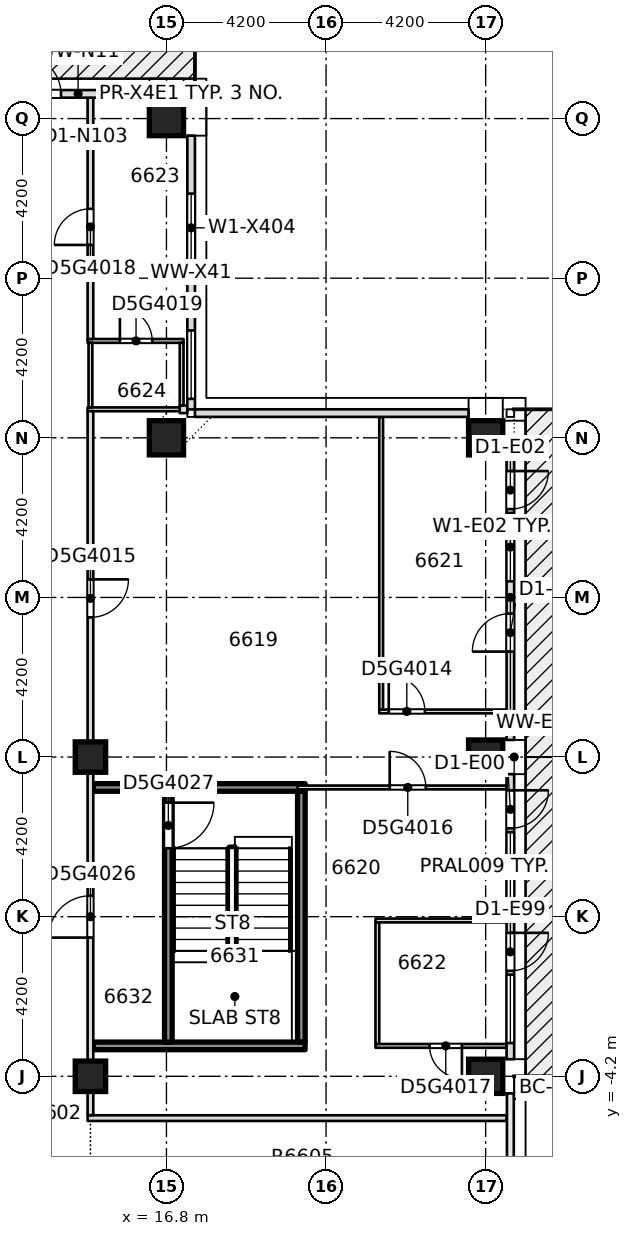
"""IFC4 building model, lengths in metres.
Left out: names, types, materials, properties, quantities, classifications, styles, units other than length and angle.
Written with IfcOpenShell. Run it as: python <this file> out.ifc"""

import sys

from ifc_helpers import new_model, si_unit, direction, frame, frame_2d, origin, origin_2d, place, context, subcontext, project, spatial, rectangle, extrude, element, fill, save


model = new_model("IFC4")
c1 = context("Model", 3, precision=1e-05, world=origin(), true_north=direction((0.0, 1.0)))
c2 = subcontext(c1, "Body", "Model", "MODEL_VIEW")
j1 = project(units=[si_unit("LENGTHUNIT", "METRE"), si_unit("PLANEANGLEUNIT", "RADIAN")], contexts=[c1])
p1 = place(None, origin())
s1 = spatial("IfcSite", under=j1, at=p1, CompositionType="ELEMENT")
p2 = place(p1, origin())
s2 = spatial("IfcBuilding", under=s1, at=p2, CompositionType="ELEMENT")
p3 = place(p2, frame((0.0, 0.0, 251.05)))
s3 = spatial("IfcBuildingStorey", under=s2, at=p3, CompositionType="ELEMENT", Elevation=251.05)
for number, where, z_axis, x_axis in (
    (1, (25.2, -4.2, -0.4), (0.0, 0.0, 1.0), (1.0, 0.0, 0.0)),
    (2, (25.2, 4.2, -0.4), (0.0, 0.0, 1.0), (1.0, 0.0, 0.0)),
    (3, (16.8, 12.6, -0.4), (0.0, 0.0, 1.0), (1.0, 0.0, 0.0)),
    (4, (25.2, 12.6, -0.4), (0.0, 0.0, 1.0), (1.0, 0.0, 0.0)),
    (5, (16.8, 21.0, -0.4), (0.0, 0.0, 1.0), (1.0, 0.0, 0.0)),
):
    element("IfcColumn", number, at=place(p3, frame(where, z_axis=z_axis, x_axis=x_axis)), inside=s3, PredefinedType="COLUMN", context=c2, shape_type="SweptSolid", body=[
        extrude(rectangle(XDim=0.9, YDim=0.9, at=origin_2d()), origin(), (0.0, 0.0, 1.0), 3.45),
    ])
for number, where, z_axis, x_axis in (
    (6, (14.8, -4.2, -0.4), (0.0, 0.0, 1.0), (1.0, 0.0, 0.0)),
    (7, (14.8, 4.2, -0.4), (0.0, 0.0, 1.0), (1.0, 0.0, 0.0)),
):
    element("IfcColumn", number, at=place(p3, frame(where, z_axis=z_axis, x_axis=x_axis)), inside=s3, PredefinedType="COLUMN", context=c2, shape_type="SweptSolid", body=[
        extrude(rectangle(XDim=0.8, YDim=0.8, at=origin_2d()), origin(), (0.0, 0.0, 1.0), 3.45),
    ])
p4 = place(p3, frame((14.727, -5.3, 0.0), z_axis=(0.0, 0.0, 1.0), x_axis=(1.0, 0.0, 0.0)))
e8 = element("IfcWall", 8, at=p4, inside=s3, PredefinedType="PARTITIONING", context=c2, shape_type="SweptSolid", body=[
    extrude(rectangle(XDim=11.023, YDim=0.15, at=frame_2d((5.511, 0.0))), origin(), (0.0, 0.0, 1.0), 3.05),
])
p5 = place(p3, frame((14.877, -3.4, 0.0), z_axis=(0.0, 0.0, 1.0), x_axis=(1.0, 0.0, 0.0)))
e9 = element("IfcWall", 9, at=p5, inside=s3, PredefinedType="SOLIDWALL", context=c2, shape_type="SweptSolid", body=[
    extrude(rectangle(XDim=5.571, YDim=0.2, at=frame_2d((2.786, 0.0))), origin(), (0.0, 0.0, 1.0), 3.05),
])
p6 = place(p3, frame((22.302, -3.4, 0.0), z_axis=(0.0, 0.0, 1.0), x_axis=(1.0, 0.0, 0.0)))
e10 = element("IfcWall", 10, at=p6, inside=s3, PredefinedType="PARTITIONING", context=c2, shape_type="SweptSolid", body=[
    extrude(rectangle(XDim=3.448, YDim=0.1, at=frame_2d((1.724, 0.0))), origin(), (0.0, 0.0, 1.0), 3.05),
])
p7 = place(p6, frame((1.423, 0.0, 0.0)))
e11 = element("IfcOpeningElement", 11, at=p7, cuts=e10, PredefinedType="OPENING", context=c2, shape_type="SweptSolid", body=[
    extrude(rectangle(XDim=0.85, YDim=2.1, at=frame_2d((0.425, 1.05))), frame((0.0, 0.06, 0.0), z_axis=(0.0, -1.0, 0.0), x_axis=(1.0, 0.0, 0.0)), (0.0, 0.0, 1.0), 0.12),
])
p8 = place(p3, frame((22.302, -0.1, 0.0), z_axis=(0.0, 0.0, 1.0), x_axis=(1.0, 0.0, 0.0)))
e12 = element("IfcWall", 12, at=p8, inside=s3, PredefinedType="PARTITIONING", context=c2, shape_type="SweptSolid", body=[
    extrude(rectangle(XDim=3.448, YDim=0.1, at=frame_2d((1.724, 0.0))), origin(), (0.0, 0.0, 1.0), 3.05),
])
p9 = place(p3, frame((14.875, 3.4, 0.0), z_axis=(0.0, 0.0, 1.0), x_axis=(1.0, 0.0, 0.0)))
e13 = element("IfcWall", 13, at=p9, inside=s3, PredefinedType="SOLIDWALL", context=c2, shape_type="SweptSolid", body=[
    extrude(rectangle(XDim=5.575, YDim=0.2, at=frame_2d((2.788, 0.0))), origin(), (0.0, 0.0, 1.0), 3.05),
])
p10 = place(p3, frame((20.25, 3.4, 0.0), z_axis=(0.0, 0.0, 1.0), x_axis=(1.0, 0.0, 0.0)))
e14 = element("IfcWall", 14, at=p10, inside=s3, PredefinedType="PARTITIONING", context=c2, shape_type="SweptSolid", body=[
    extrude(rectangle(XDim=5.5, YDim=0.1, at=frame_2d((2.75, 0.0))), origin(), (0.0, 0.0, 1.0), 3.05),
])
p11 = place(p10, frame((2.425, 0.0, 0.0)))
e15 = element("IfcOpeningElement", 15, at=p11, cuts=e14, PredefinedType="OPENING", context=c2, shape_type="SweptSolid", body=[
    extrude(rectangle(XDim=0.95, YDim=2.1, at=frame_2d((0.475, 1.05))), frame((0.0, 0.06, 0.0), z_axis=(0.0, -1.0, 0.0), x_axis=(1.0, 0.0, 0.0)), (0.0, 0.0, 1.0), 0.12),
])
p12 = place(p3, frame((22.4, 5.4, 0.0), z_axis=(0.0, 0.0, 1.0), x_axis=(1.0, 0.0, 0.0)))
e16 = element("IfcWall", 16, at=p12, inside=s3, PredefinedType="PARTITIONING", context=c2, shape_type="SweptSolid", body=[
    extrude(rectangle(XDim=3.35, YDim=0.1, at=frame_2d((1.675, 0.0))), origin(), (0.0, 0.0, 1.0), 3.05),
])
p13 = place(p12, frame((0.25, 0.0, 0.0)))
e17 = element("IfcOpeningElement", 17, at=p13, cuts=e16, PredefinedType="OPENING", context=c2, shape_type="SweptSolid", body=[
    extrude(rectangle(XDim=0.95, YDim=2.1, at=frame_2d((0.475, 1.05))), frame((0.0, 0.06, 0.0), z_axis=(0.0, -1.0, 0.0), x_axis=(1.0, 0.0, 0.0)), (0.0, 0.0, 1.0), 0.12),
])
p14 = place(p3, frame((14.725, 13.35, 0.0), z_axis=(0.0, 0.0, 1.0), x_axis=(1.0, 0.0, 0.0)))
e18 = element("IfcWall", 18, at=p14, inside=s3, PredefinedType="PARTITIONING", context=c2, shape_type="SweptSolid", body=[
    extrude(rectangle(XDim=2.525, YDim=0.1, at=frame_2d((1.262, 0.0))), origin(), (0.0, 0.0, 1.0), 3.05),
])
p15 = place(p3, frame((17.15, 13.35, 0.0), z_axis=(0.0, 0.0, 1.0), x_axis=(1.0, 0.0, 0.0)))
e19 = element("IfcWall", 19, at=p15, inside=s3, PredefinedType="PARTITIONING", context=c2, shape_type="SweptSolid", body=[
    extrude(rectangle(XDim=0.2, YDim=0.2, at=frame_2d((0.1, 0.0))), origin(), (0.0, 0.0, 1.0), 3.05),
])
p16 = place(p3, frame((14.725, 15.15, 0.0), z_axis=(0.0, 0.0, 1.0), x_axis=(1.0, 0.0, 0.0)))
e20 = element("IfcWall", 20, at=p16, inside=s3, PredefinedType="PARTITIONING", context=c2, shape_type="SweptSolid", body=[
    extrude(rectangle(XDim=2.525, YDim=0.1, at=frame_2d((1.262, 0.0))), origin(), (0.0, 0.0, 1.0), 3.05),
])
p17 = place(p16, frame((0.85, 0.0, 0.0)))
e21 = element("IfcOpeningElement", 21, at=p17, cuts=e20, PredefinedType="OPENING", context=c2, shape_type="SweptSolid", body=[
    extrude(rectangle(XDim=0.85, YDim=2.1, at=frame_2d((0.425, 1.05))), frame((0.0, 0.06, 0.0), z_axis=(0.0, -1.0, 0.0), x_axis=(1.0, 0.0, 0.0)), (0.0, 0.0, 1.0), 0.12),
])
p18 = place(p3, frame((14.8, -5.223, 0.0), z_axis=(0.0, 0.0, 1.0), x_axis=(0.0, 1.0, 0.0)))
e22 = element("IfcWall", 22, at=p18, inside=s3, PredefinedType="PARTITIONING", context=c2, shape_type="SweptSolid", body=[
    extrude(rectangle(XDim=18.523, YDim=0.15, at=frame_2d((9.261, 0.0))), origin(), (0.0, 0.0, 1.0), 3.05),
])
p19 = place(p18, frame((13.098, 0.0, 0.0)))
e23 = element("IfcOpeningElement", 23, at=p19, cuts=e22, PredefinedType="OPENING", context=c2, shape_type="SweptSolid", body=[
    extrude(rectangle(XDim=1.0, YDim=2.1, at=frame_2d((0.5, 1.05))), frame((0.0, 0.085, 0.0), z_axis=(0.0, -1.0, 0.0), x_axis=(1.0, 0.0, 0.0)), (0.0, 0.0, 1.0), 0.17),
])
p20 = place(p18, frame((4.673, 0.0, 0.0)))
e24 = element("IfcOpeningElement", 24, at=p20, cuts=e22, PredefinedType="OPENING", context=c2, shape_type="SweptSolid", body=[
    extrude(rectangle(XDim=1.1, YDim=2.1, at=frame_2d((0.55, 1.05))), frame((0.0, 0.085, 0.0), z_axis=(0.0, -1.0, 0.0), x_axis=(1.0, 0.0, 0.0)), (0.0, 0.0, 1.0), 0.17),
])
p21 = place(p3, frame((14.8, 13.4, 0.0), z_axis=(0.0, 0.0, 1.0), x_axis=(0.0, 1.0, 0.0)))
e25 = element("IfcWall", 25, at=p21, inside=s3, PredefinedType="PARTITIONING", context=c2, shape_type="SweptSolid", body=[
    extrude(rectangle(XDim=1.7, YDim=0.1, at=frame_2d((0.85, 0.0))), origin(), (0.0, 0.0, 1.0), 3.05),
])
p22 = place(p3, frame((14.8, 15.2, 0.0), z_axis=(0.0, 0.0, 1.0), x_axis=(0.0, 1.0, 0.0)))
e26 = element("IfcWall", 26, at=p22, inside=s3, PredefinedType="PARTITIONING", context=c2, shape_type="SweptSolid", body=[
    extrude(rectangle(XDim=6.35, YDim=0.15, at=frame_2d((3.175, 0.0))), origin(), (0.0, 0.0, 1.0), 3.05),
])
p23 = place(p22, frame((2.475, 0.0, 0.0)))
e27 = element("IfcOpeningElement", 27, at=p23, cuts=e26, PredefinedType="OPENING", context=c2, shape_type="SweptSolid", body=[
    extrude(rectangle(XDim=0.95, YDim=2.1, at=frame_2d((0.475, 1.05))), frame((0.0, 0.085, 0.0), z_axis=(0.0, -1.0, 0.0), x_axis=(1.0, 0.0, 0.0)), (0.0, 0.0, 1.0), 0.17),
])
p24 = place(p3, frame((16.85, -3.3, 0.0), z_axis=(0.0, 0.0, 1.0), x_axis=(0.0, 1.0, 0.0)))
e28 = element("IfcWall", 28, at=p24, inside=s3, PredefinedType="SOLIDWALL", context=c2, shape_type="SweptSolid", body=[
    extrude(rectangle(XDim=6.6, YDim=0.2, at=frame_2d((3.3, 0.0))), origin(), (0.0, 0.0, 1.0), 3.05),
])
p25 = place(p24, frame((5.1, 0.0, 0.0)))
e29 = element("IfcOpeningElement", 29, at=p25, cuts=e28, PredefinedType="OPENING", context=c2, shape_type="SweptSolid", body=[
    extrude(rectangle(XDim=1.2, YDim=2.1, at=frame_2d((0.6, 1.05))), frame((0.0, 0.11, 0.0), z_axis=(0.0, -1.0, 0.0), x_axis=(1.0, 0.0, 0.0)), (0.0, 0.0, 1.0), 0.22),
])
p26 = place(p3, frame((17.2, 13.45, 0.0), z_axis=(0.0, 0.0, 1.0), x_axis=(0.0, 1.0, 0.0)))
e30 = element("IfcWall", 30, at=p26, inside=s3, PredefinedType="PARTITIONING", context=c2, shape_type="SweptSolid", body=[
    extrude(rectangle(XDim=1.65, YDim=0.1, at=frame_2d((0.825, 0.0))), origin(), (0.0, 0.0, 1.0), 3.05),
])
p27 = place(p3, frame((20.35, -3.298, 0.0), z_axis=(0.0, 0.0, 1.0), x_axis=(0.0, 1.0, 0.0)))
e31 = element("IfcWall", 31, at=p27, inside=s3, PredefinedType="SOLIDWALL", context=c2, shape_type="SweptSolid", body=[
    extrude(rectangle(XDim=6.598, YDim=0.2, at=frame_2d((3.299, 0.0))), origin(), (0.0, 0.0, 1.0), 3.05),
])
p28 = place(p3, frame((22.35, -3.348, 0.0), z_axis=(0.0, 0.0, 1.0), x_axis=(0.0, 1.0, 0.0)))
e32 = element("IfcWall", 32, at=p28, inside=s3, PredefinedType="PARTITIONING", context=c2, shape_type="SweptSolid", body=[
    extrude(rectangle(XDim=3.196, YDim=0.1, at=frame_2d((1.598, 0.0))), origin(), (0.0, 0.0, 1.0), 3.05),
])
p29 = place(p3, frame((22.45, 5.45, 0.0), z_axis=(0.0, 0.0, 1.0), x_axis=(0.0, 1.0, 0.0)))
e33 = element("IfcWall", 33, at=p29, inside=s3, PredefinedType="PARTITIONING", context=c2, shape_type="SweptSolid", body=[
    extrude(rectangle(XDim=7.7, YDim=0.1, at=frame_2d((3.85, 0.0))), origin(), (0.0, 0.0, 1.0), 3.05),
])
p30 = place(p3, frame((25.85, -3.75, 0.0), z_axis=(0.0, 0.0, 1.0), x_axis=(0.0, 1.0, 0.0)))
e34 = element("IfcWall", 34, at=p30, inside=s3, PredefinedType="STANDARD", context=c2, shape_type="SweptSolid", body=[
    extrude(rectangle(XDim=7.5, YDim=0.2, at=frame_2d((3.75, 0.0))), origin(), (0.0, 0.0, 1.0), 3.05),
])
p31 = place(p30, frame((0.425, 0.0, 0.2)))
e35 = element("IfcOpeningElement", 35, at=p31, cuts=e34, PredefinedType="OPENING", context=c2, shape_type="SweptSolid", body=[
    extrude(rectangle(XDim=1.8, YDim=2.65, at=frame_2d((0.9, 1.325))), frame((0.0, 0.11, 0.0), z_axis=(0.0, -1.0, 0.0), x_axis=(1.0, 0.0, 0.0)), (0.0, 0.0, 1.0), 0.22),
])
p32 = place(p30, frame((2.325, 0.0, 0.0)))
e36 = element("IfcOpeningElement", 36, at=p32, cuts=e34, PredefinedType="OPENING", context=c2, shape_type="SweptSolid", body=[
    extrude(rectangle(XDim=1.0, YDim=2.4, at=frame_2d((0.5, 1.2))), frame((0.0, 0.11, 0.0), z_axis=(0.0, -1.0, 0.0), x_axis=(1.0, 0.0, 0.0)), (0.0, 0.0, 1.0), 0.22),
])
p33 = place(p30, frame((4.175, 0.0, 0.2)))
e37 = element("IfcOpeningElement", 37, at=p33, cuts=e34, PredefinedType="OPENING", context=c2, shape_type="SweptSolid", body=[
    extrude(rectangle(XDim=1.8, YDim=2.65, at=frame_2d((0.9, 1.325))), frame((0.0, 0.11, 0.0), z_axis=(0.0, -1.0, 0.0), x_axis=(1.0, 0.0, 0.0)), (0.0, 0.0, 1.0), 0.22),
])
p34 = place(p30, frame((6.075, 0.0, 0.0)))
e38 = element("IfcOpeningElement", 38, at=p34, cuts=e34, PredefinedType="OPENING", context=c2, shape_type="SweptSolid", body=[
    extrude(rectangle(XDim=1.0, YDim=2.4, at=frame_2d((0.5, 1.2))), frame((0.0, 0.11, 0.0), z_axis=(0.0, -1.0, 0.0), x_axis=(1.0, 0.0, 0.0)), (0.0, 0.0, 1.0), 0.22),
])
p35 = place(p3, frame((25.85, 4.65, 0.0), z_axis=(0.0, 0.0, 1.0), x_axis=(0.0, 1.0, 0.0)))
e39 = element("IfcWall", 39, at=p35, inside=s3, PredefinedType="STANDARD", context=c2, shape_type="SweptSolid", body=[
    extrude(rectangle(XDim=7.5, YDim=0.2, at=frame_2d((3.75, 0.0))), origin(), (0.0, 0.0, 1.0), 3.05),
])
p36 = place(p35, frame((2.325, 0.0, 0.0)))
e40 = element("IfcOpeningElement", 40, at=p36, cuts=e39, PredefinedType="OPENING", context=c2, shape_type="SweptSolid", body=[
    extrude(rectangle(XDim=1.0, YDim=2.4, at=frame_2d((0.5, 1.2))), frame((0.0, 0.11, 0.0), z_axis=(0.0, -1.0, 0.0), x_axis=(1.0, 0.0, 0.0)), (0.0, 0.0, 1.0), 0.22),
])
p37 = place(p35, frame((4.175, 0.0, 0.2)))
e41 = element("IfcOpeningElement", 41, at=p37, cuts=e39, PredefinedType="OPENING", context=c2, shape_type="SweptSolid", body=[
    extrude(rectangle(XDim=1.8, YDim=2.65, at=frame_2d((0.9, 1.325))), frame((0.0, 0.11, 0.0), z_axis=(0.0, -1.0, 0.0), x_axis=(1.0, 0.0, 0.0)), (0.0, 0.0, 1.0), 0.22),
])
p38 = place(p35, frame((6.075, 0.0, 0.0)))
e42 = element("IfcOpeningElement", 42, at=p38, cuts=e39, PredefinedType="OPENING", context=c2, shape_type="SweptSolid", body=[
    extrude(rectangle(XDim=1.0, YDim=2.4, at=frame_2d((0.5, 1.2))), frame((0.0, 0.11, 0.0), z_axis=(0.0, -1.0, 0.0), x_axis=(1.0, 0.0, 0.0)), (0.0, 0.0, 1.0), 0.22),
])
p39 = place(p3, frame((24.75, 13.25, 0.0), z_axis=(0.0, 0.0, 1.0), x_axis=(-1.0, 0.0, 0.0)))
e43 = element("IfcWall", 43, at=p39, inside=s3, PredefinedType="STANDARD", context=c2, shape_type="SweptSolid", body=[
    extrude(rectangle(XDim=7.2, YDim=0.2, at=frame_2d((3.6, 0.0))), origin(), (0.0, 0.0, 1.0), 3.05),
])
p40 = place(p3, frame((17.45, 13.35, 0.0), z_axis=(0.0, 0.0, 1.0), x_axis=(0.0, 1.0, 0.0)))
e44 = element("IfcWall", 44, at=p40, inside=s3, PredefinedType="STANDARD", context=c2, shape_type="SweptSolid", body=[
    extrude(rectangle(XDim=7.2, YDim=0.2, at=frame_2d((3.6, 0.0))), origin(), (0.0, 0.0, 1.0), 3.05),
])
p41 = place(p40, frame((0.275, 0.0, 0.2)))
e45 = element("IfcOpeningElement", 45, at=p41, cuts=e44, PredefinedType="OPENING", context=c2, shape_type="SweptSolid", body=[
    extrude(rectangle(XDim=1.8, YDim=2.65, at=frame_2d((0.9, 1.325))), frame((0.0, 0.11, 0.0), z_axis=(0.0, -1.0, 0.0), x_axis=(1.0, 0.0, 0.0)), (0.0, 0.0, 1.0), 0.22),
])
p42 = place(p40, frame((3.875, 0.0, 0.2)))
e46 = element("IfcOpeningElement", 46, at=p42, cuts=e44, PredefinedType="OPENING", context=c2, shape_type="SweptSolid", body=[
    extrude(rectangle(XDim=1.8, YDim=2.65, at=frame_2d((0.9, 1.325))), frame((0.0, 0.11, 0.0), z_axis=(0.0, -1.0, 0.0), x_axis=(1.0, 0.0, 0.0)), (0.0, 0.0, 1.0), 0.22),
])
p43 = place(p3, frame((16.35, 21.65, 0.0), z_axis=(0.0, 0.0, 1.0), x_axis=(-1.0, 0.0, 0.0)))
e47 = element("IfcWall", 47, at=p43, inside=s3, PredefinedType="STANDARD", context=c2, shape_type="SweptSolid", body=[
    extrude(rectangle(XDim=3.75, YDim=0.2, at=frame_2d((1.875, 0.0))), origin(), (0.0, 0.0, 1.0), 3.05),
])
p44 = place(p43, frame((2.325, 0.0, 0.0)))
e48 = element("IfcOpeningElement", 48, at=p44, cuts=e47, PredefinedType="OPENING", context=c2, shape_type="SweptSolid", body=[
    extrude(rectangle(XDim=1.0, YDim=2.4, at=frame_2d((0.5, 1.2))), frame((0.0, 0.11, 0.0), z_axis=(0.0, -1.0, 0.0), x_axis=(1.0, 0.0, 0.0)), (0.0, 0.0, 1.0), 0.22),
])
p45 = place(p13, origin())
e49 = element("IfcDoor", 49, at=p45, inside=s3, OperationType="SINGLE_SWING_LEFT", PredefinedType="DOOR", context=c2, shape_type="SweptSolid", body=[
    extrude(rectangle(XDim=0.95, YDim=2.1, at=frame_2d((0.475, 1.05))), frame((0.0, 0.025, 0.0), z_axis=(0.0, -1.0, 0.0), x_axis=(1.0, 0.0, 0.0)), (0.0, 0.0, 1.0), 0.05),
])
fill(e17, e49)
p46 = place(p19, origin())
e50 = element("IfcDoor", 50, at=p46, inside=s3, OperationType="SINGLE_SWING_RIGHT", PredefinedType="DOOR", context=c2, shape_type="SweptSolid", body=[
    extrude(rectangle(XDim=1.0, YDim=2.1, at=frame_2d((0.5, 1.05))), frame((0.0, 0.025, 0.0), z_axis=(0.0, -1.0, 0.0), x_axis=(1.0, 0.0, 0.0)), (0.0, 0.0, 1.0), 0.05),
])
fill(e23, e50)
p47 = place(p11, origin())
e51 = element("IfcDoor", 51, at=p47, inside=s3, OperationType="SINGLE_SWING_LEFT", PredefinedType="DOOR", context=c2, shape_type="SweptSolid", body=[
    extrude(rectangle(XDim=0.95, YDim=2.1, at=frame_2d((0.475, 1.05))), frame((0.0, 0.025, 0.0), z_axis=(0.0, -1.0, 0.0), x_axis=(1.0, 0.0, 0.0)), (0.0, 0.0, 1.0), 0.05),
])
fill(e15, e51)
p48 = place(p7, origin())
e52 = element("IfcDoor", 52, at=p48, inside=s3, OperationType="SINGLE_SWING_LEFT", PredefinedType="DOOR", context=c2, shape_type="SweptSolid", body=[
    extrude(rectangle(XDim=0.85, YDim=2.1, at=frame_2d((0.425, 1.05))), frame((0.0, 0.025, 0.0), z_axis=(0.0, -1.0, 0.0), x_axis=(1.0, 0.0, 0.0)), (0.0, 0.0, 1.0), 0.05),
])
fill(e11, e52)
p49 = place(p23, origin())
e53 = element("IfcDoor", 53, at=p49, inside=s3, OperationType="SINGLE_SWING_LEFT", PredefinedType="DOOR", context=c2, shape_type="SweptSolid", body=[
    extrude(rectangle(XDim=0.95, YDim=2.1, at=frame_2d((0.475, 1.05))), frame((0.0, 0.025, 0.0), z_axis=(0.0, -1.0, 0.0), x_axis=(1.0, 0.0, 0.0)), (0.0, 0.0, 1.0), 0.05),
])
fill(e27, e53)
p50 = place(p17, origin())
e54 = element("IfcDoor", 54, at=p50, inside=s3, OperationType="SINGLE_SWING_RIGHT", PredefinedType="DOOR", context=c2, shape_type="SweptSolid", body=[
    extrude(rectangle(XDim=0.85, YDim=2.1, at=frame_2d((0.425, 1.05))), frame((0.0, 0.025, 0.0), z_axis=(0.0, -1.0, 0.0), x_axis=(1.0, 0.0, 0.0)), (0.0, 0.0, 1.0), 0.05),
])
fill(e21, e54)
p51 = place(p20, origin())
e55 = element("IfcDoor", 55, at=p51, inside=s3, OperationType="SINGLE_SWING_RIGHT", PredefinedType="DOOR", context=c2, shape_type="SweptSolid", body=[
    extrude(rectangle(XDim=1.1, YDim=2.1, at=frame_2d((0.55, 1.05))), frame((0.0, 0.025, 0.0), z_axis=(0.0, -1.0, 0.0), x_axis=(1.0, 0.0, 0.0)), (0.0, 0.0, 1.0), 0.05),
])
fill(e24, e55)
p52 = place(p25, origin())
e56 = element("IfcDoor", 56, at=p52, inside=s3, OperationType="SINGLE_SWING_LEFT", PredefinedType="DOOR", context=c2, shape_type="SweptSolid", body=[
    extrude(rectangle(XDim=1.2, YDim=2.1, at=frame_2d((0.6, 1.05))), frame((0.0, 0.025, 0.0), z_axis=(0.0, -1.0, 0.0), x_axis=(1.0, 0.0, 0.0)), (0.0, 0.0, 1.0), 0.05),
])
fill(e29, e56)
p53 = place(p31, origin())
e57 = element("IfcWindow", 57, at=p53, inside=s3, PartitioningType="SINGLE_PANEL", PredefinedType="WINDOW", context=c2, shape_type="SweptSolid", body=[
    extrude(rectangle(XDim=1.8, YDim=2.65, at=frame_2d((0.9, 1.325))), frame((0.0, 0.03, 0.0), z_axis=(0.0, -1.0, 0.0), x_axis=(1.0, 0.0, 0.0)), (0.0, 0.0, 1.0), 0.06),
])
fill(e35, e57)
p54 = place(p32, origin())
e58 = element("IfcDoor", 58, at=p54, inside=s3, OperationType="SINGLE_SWING_LEFT", PredefinedType="DOOR", context=c2, shape_type="SweptSolid", body=[
    extrude(rectangle(XDim=1.0, YDim=2.4, at=frame_2d((0.5, 1.2))), frame((0.0, 0.025, 0.0), z_axis=(0.0, -1.0, 0.0), x_axis=(1.0, 0.0, 0.0)), (0.0, 0.0, 1.0), 0.05),
])
fill(e36, e58)
p55 = place(p33, origin())
e59 = element("IfcWindow", 59, at=p55, inside=s3, PartitioningType="SINGLE_PANEL", PredefinedType="WINDOW", context=c2, shape_type="SweptSolid", body=[
    extrude(rectangle(XDim=1.8, YDim=2.65, at=frame_2d((0.9, 1.325))), frame((0.0, 0.03, 0.0), z_axis=(0.0, -1.0, 0.0), x_axis=(1.0, 0.0, 0.0)), (0.0, 0.0, 1.0), 0.06),
])
fill(e37, e59)
p56 = place(p34, origin())
e60 = element("IfcDoor", 60, at=p56, inside=s3, OperationType="SINGLE_SWING_LEFT", PredefinedType="DOOR", context=c2, shape_type="SweptSolid", body=[
    extrude(rectangle(XDim=1.0, YDim=2.4, at=frame_2d((0.5, 1.2))), frame((0.0, 0.025, 0.0), z_axis=(0.0, -1.0, 0.0), x_axis=(1.0, 0.0, 0.0)), (0.0, 0.0, 1.0), 0.05),
])
fill(e38, e60)
p57 = place(p36, origin())
e61 = element("IfcDoor", 61, at=p57, inside=s3, OperationType="SINGLE_SWING_LEFT", PredefinedType="DOOR", context=c2, shape_type="SweptSolid", body=[
    extrude(rectangle(XDim=1.0, YDim=2.4, at=frame_2d((0.5, 1.2))), frame((0.0, 0.025, 0.0), z_axis=(0.0, -1.0, 0.0), x_axis=(1.0, 0.0, 0.0)), (0.0, 0.0, 1.0), 0.05),
])
fill(e40, e61)
p58 = place(p37, origin())
e62 = element("IfcWindow", 62, at=p58, inside=s3, PartitioningType="SINGLE_PANEL", PredefinedType="WINDOW", context=c2, shape_type="SweptSolid", body=[
    extrude(rectangle(XDim=1.8, YDim=2.65, at=frame_2d((0.9, 1.325))), frame((0.0, 0.03, 0.0), z_axis=(0.0, -1.0, 0.0), x_axis=(1.0, 0.0, 0.0)), (0.0, 0.0, 1.0), 0.06),
])
fill(e41, e62)
p59 = place(p38, origin())
e63 = element("IfcDoor", 63, at=p59, inside=s3, OperationType="SINGLE_SWING_LEFT", PredefinedType="DOOR", context=c2, shape_type="SweptSolid", body=[
    extrude(rectangle(XDim=1.0, YDim=2.4, at=frame_2d((0.5, 1.2))), frame((0.0, 0.025, 0.0), z_axis=(0.0, -1.0, 0.0), x_axis=(1.0, 0.0, 0.0)), (0.0, 0.0, 1.0), 0.05),
])
fill(e42, e63)
p60 = place(p41, origin())
e64 = element("IfcWindow", 64, at=p60, inside=s3, PartitioningType="SINGLE_PANEL", PredefinedType="WINDOW", context=c2, shape_type="SweptSolid", body=[
    extrude(rectangle(XDim=1.8, YDim=2.65, at=frame_2d((0.9, 1.325))), frame((0.0, 0.03, 0.0), z_axis=(0.0, -1.0, 0.0), x_axis=(1.0, 0.0, 0.0)), (0.0, 0.0, 1.0), 0.06),
])
fill(e45, e64)
p61 = place(p42, origin())
e65 = element("IfcWindow", 65, at=p61, inside=s3, PartitioningType="SINGLE_PANEL", PredefinedType="WINDOW", context=c2, shape_type="SweptSolid", body=[
    extrude(rectangle(XDim=1.8, YDim=2.65, at=frame_2d((0.9, 1.325))), frame((0.0, 0.03, 0.0), z_axis=(0.0, -1.0, 0.0), x_axis=(1.0, 0.0, 0.0)), (0.0, 0.0, 1.0), 0.06),
])
fill(e46, e65)
p62 = place(p44, origin())
e66 = element("IfcDoor", 66, at=p62, inside=s3, OperationType="SINGLE_SWING_LEFT", PredefinedType="DOOR", context=c2, shape_type="SweptSolid", body=[
    extrude(rectangle(XDim=1.0, YDim=2.4, at=frame_2d((0.5, 1.2))), frame((0.0, 0.025, 0.0), z_axis=(0.0, -1.0, 0.0), x_axis=(1.0, 0.0, 0.0)), (0.0, 0.0, 1.0), 0.05),
])
fill(e48, e66)
save(model, sys.argv[1])
